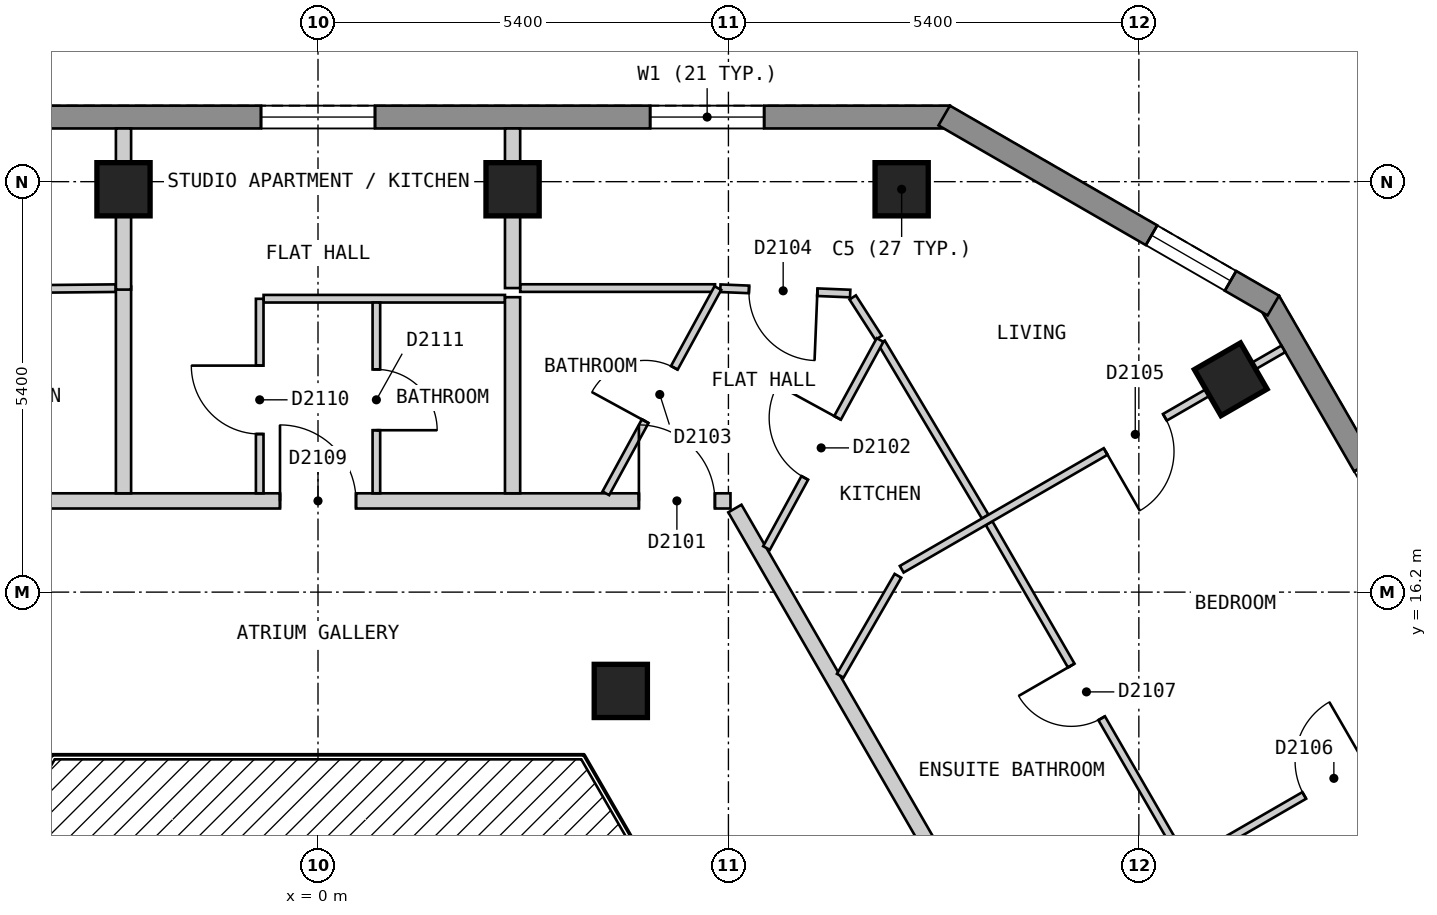
"""IFC4 building model, lengths in metres.
Left out: names, types, materials, properties, quantities, classifications, styles, units other than length and angle.
Written with IfcOpenShell. Run it as: python <this file> out.ifc"""

import sys

from ifc_helpers import new_model, si_unit, direction, frame, frame_2d, origin, origin_2d, place, context, subcontext, project, spatial, polyline, rectangle, outline, extrude, element, fill, save


model = new_model("IFC4")
c1 = context("Model", 3, precision=1e-05, world=origin(), true_north=direction((0.0, 1.0)))
c2 = subcontext(c1, "Body", "Model", "MODEL_VIEW")
j1 = project(units=[si_unit("LENGTHUNIT", "METRE"), si_unit("PLANEANGLEUNIT", "RADIAN")], contexts=[c1])
p1 = place(None, origin())
s1 = spatial("IfcSite", under=j1, at=p1, CompositionType="ELEMENT")
p2 = place(p1, origin())
s2 = spatial("IfcBuilding", under=s1, at=p2, CompositionType="ELEMENT")
p3 = place(p2, frame((0.0, 0.0, 205.8)))
s3 = spatial("IfcBuildingStorey", under=s2, at=p3, CompositionType="ELEMENT", Elevation=205.8)
for number, where, z_axis, x_axis in (
    (1, (7.679, 21.5, 0.0), (0.0, 0.0, 1.0), (-1.0, 0.0, 0.0)),
    (2, (2.56, 21.5, 0.0), (0.0, 0.0, 1.0), (-1.0, 0.0, 0.0)),
    (3, (-2.559, 21.5, 0.0), (0.0, 0.0, 1.0), (-1.0, 0.0, 0.0)),
    (4, (12.009, 19.0, 0.0), (0.0, 0.0, 1.0), (-0.5, 0.866, 0.0)),
    (5, (3.984, 14.9, 0.0), (0.0, 0.0, 1.0), (1.0, 0.0, 0.0)),
):
    element("IfcColumn", number, at=place(p3, frame(where, z_axis=z_axis, x_axis=x_axis)), inside=s3, PredefinedType="COLUMN", context=c2, shape_type="SweptSolid", body=[
        extrude(rectangle(XDim=0.7, YDim=0.7, at=origin_2d()), origin(), (0.0, 0.0, 1.0), 3.0),
    ])
p4 = place(p3, frame((8.314, 22.45, 0.0), z_axis=(0.0, 0.0, 1.0), x_axis=(-1.0, 0.0, 0.0)))
e6 = element("IfcWall", 6, at=p4, inside=s3, PredefinedType="SOLIDWALL", context=c2, shape_type="SweptSolid", body=[
    extrude(outline(polyline([(0.0, -0.15), (16.628, -0.15), (16.548, 0.15), (0.08, 0.15), (0.0, -0.15)])), origin(), (0.0, 0.0, 1.0), 2.7),
])
p5 = place(p4, frame((2.444, 0.0, 0.15)))
e7 = element("IfcOpeningElement", 7, at=p5, cuts=e6, PredefinedType="OPENING", context=c2, shape_type="SweptSolid", body=[
    extrude(rectangle(XDim=1.5, YDim=2.1, at=frame_2d((0.75, 1.05))), frame((0.0, 0.16, 0.0), z_axis=(0.0, -1.0, 0.0), x_axis=(1.0, 0.0, 0.0)), (0.0, 0.0, 1.0), 0.32),
])
p6 = place(p4, frame((7.564, 0.0, 0.15)))
e8 = element("IfcOpeningElement", 8, at=p6, cuts=e6, PredefinedType="OPENING", context=c2, shape_type="SweptSolid", body=[
    extrude(rectangle(XDim=1.5, YDim=2.1, at=frame_2d((0.75, 1.05))), frame((0.0, 0.16, 0.0), z_axis=(0.0, -1.0, 0.0), x_axis=(1.0, 0.0, 0.0)), (0.0, 0.0, 1.0), 0.32),
])
p7 = place(p4, frame((12.683, 0.0, 0.15)))
e9 = element("IfcOpeningElement", 9, at=p7, cuts=e6, PredefinedType="OPENING", context=c2, shape_type="SweptSolid", body=[
    extrude(rectangle(XDim=1.5, YDim=2.1, at=frame_2d((0.75, 1.05))), frame((0.0, 0.16, 0.0), z_axis=(0.0, -1.0, 0.0), x_axis=(1.0, 0.0, 0.0)), (0.0, 0.0, 1.0), 0.32),
])
p8 = place(p3, frame((23.599, 0.825, 0.0), z_axis=(0.0, 0.0, 1.0), x_axis=(-0.500003656944, 0.866023292436, 0.0)))
e10 = element("IfcWall", 10, at=p8, inside=s3, PredefinedType="SOLIDWALL", context=c2, shape_type="SweptSolid", body=[
    extrude(outline(polyline([(0.0, -0.15), (22.17, -0.15), (22.09, 0.15), (0.08, 0.15), (0.0, -0.15)])), origin(), (0.0, 0.0, 1.0), 2.7),
])
p9 = place(p8, frame((2.497, 0.0, 0.15)))
e11 = element("IfcOpeningElement", 11, at=p9, cuts=e10, PredefinedType="OPENING", context=c2, shape_type="SweptSolid", body=[
    extrude(rectangle(XDim=1.5, YDim=2.1, at=frame_2d((0.75, 1.05))), frame((0.0, 0.16, 0.0), z_axis=(0.0, -1.0, 0.0), x_axis=(1.0, 0.0, 0.0)), (0.0, 0.0, 1.0), 0.32),
])
p10 = place(p8, frame((7.723, 0.0, 0.15)))
e12 = element("IfcOpeningElement", 12, at=p10, cuts=e10, PredefinedType="OPENING", context=c2, shape_type="SweptSolid", body=[
    extrude(rectangle(XDim=1.5, YDim=2.1, at=frame_2d((0.75, 1.05))), frame((0.0, 0.16, 0.0), z_axis=(0.0, -1.0, 0.0), x_axis=(1.0, 0.0, 0.0)), (0.0, 0.0, 1.0), 0.32),
])
p11 = place(p8, frame((12.948, 0.0, 0.15)))
e13 = element("IfcOpeningElement", 13, at=p11, cuts=e10, PredefinedType="OPENING", context=c2, shape_type="SweptSolid", body=[
    extrude(rectangle(XDim=1.5, YDim=2.1, at=frame_2d((0.75, 1.05))), frame((0.0, 0.16, 0.0), z_axis=(0.0, -1.0, 0.0), x_axis=(1.0, 0.0, 0.0)), (0.0, 0.0, 1.0), 0.32),
])
p12 = place(p8, frame((18.173, 0.0, 0.15)))
e14 = element("IfcOpeningElement", 14, at=p12, cuts=e10, PredefinedType="OPENING", context=c2, shape_type="SweptSolid", body=[
    extrude(rectangle(XDim=1.5, YDim=2.1, at=frame_2d((0.75, 1.05))), frame((0.0, 0.16, 0.0), z_axis=(0.0, -1.0, 0.0), x_axis=(1.0, 0.0, 0.0)), (0.0, 0.0, 1.0), 0.32),
])
p13 = place(p3, frame((12.569, 19.97, 0.0), z_axis=(0.0, 0.0, 1.0), x_axis=(-0.866022959057, 0.500004234368, 0.0)))
e15 = element("IfcWall", 15, at=p13, inside=s3, PredefinedType="SOLIDWALL", context=c2, shape_type="SweptSolid", body=[
    extrude(outline(polyline([(0.0, -0.15), (5.0, -0.15), (4.92, 0.15), (0.08, 0.15), (0.0, -0.15)])), origin(), (0.0, 0.0, 1.0), 2.7),
])
p14 = place(p13, frame((0.65, 0.0, 0.15)))
e16 = element("IfcOpeningElement", 16, at=p14, cuts=e15, PredefinedType="OPENING", context=c2, shape_type="SweptSolid", body=[
    extrude(rectangle(XDim=1.2, YDim=2.1, at=frame_2d((0.6, 1.05))), frame((0.0, 0.16, 0.0), z_axis=(0.0, -1.0, 0.0), x_axis=(1.0, 0.0, 0.0)), (0.0, 0.0, 1.0), 0.32),
])
p15 = place(p3, frame((5.485, 17.3, 0.0), z_axis=(0.0, 0.0, 1.0), x_axis=(0.499943285704, -0.866058145322, 0.0)))
e17 = element("IfcWall", 17, at=p15, inside=s3, PredefinedType="PARTITIONING", context=c2, shape_type="SweptSolid", body=[
    extrude(rectangle(XDim=10.623, YDim=0.2, at=frame_2d((5.312, 0.0))), origin(), (0.0, 0.0, 1.0), 2.7),
])
p16 = place(p3, frame((-5.312, 17.4, 0.0), z_axis=(0.0, 0.0, 1.0), x_axis=(1.0, 0.0, 0.0)))
e18 = element("IfcWall", 18, at=p16, inside=s3, PredefinedType="PARTITIONING", context=c2, shape_type="SweptSolid", body=[
    extrude(rectangle(XDim=10.739, YDim=0.2, at=frame_2d((5.37, 0.0))), origin(), (0.0, 0.0, 1.0), 2.7),
])
p17 = place(p16, frame((9.534, 0.0, 0.0)))
e19 = element("IfcOpeningElement", 19, at=p17, cuts=e18, PredefinedType="OPENING", context=c2, shape_type="SweptSolid", body=[
    extrude(rectangle(XDim=1.0, YDim=2.1, at=frame_2d((0.5, 1.05))), frame((0.0, 0.11, 0.0), z_axis=(0.0, -1.0, 0.0), x_axis=(1.0, 0.0, 0.0)), (0.0, 0.0, 1.0), 0.22),
])
p18 = place(p16, frame((4.812, 0.0, 0.0)))
e20 = element("IfcOpeningElement", 20, at=p18, cuts=e18, PredefinedType="OPENING", context=c2, shape_type="SweptSolid", body=[
    extrude(rectangle(XDim=1.0, YDim=2.1, at=frame_2d((0.5, 1.05))), frame((0.0, 0.11, 0.0), z_axis=(0.0, -1.0, 0.0), x_axis=(1.0, 0.0, 0.0)), (0.0, 0.0, 1.0), 0.22),
])
p19 = place(p3, frame((7.035, 20.077, 0.0), z_axis=(0.0, 0.0, 1.0), x_axis=(0.540425167977, -0.841392083286, 0.0)))
e21 = element("IfcWall", 21, at=p19, inside=s3, PredefinedType="PARTITIONING", context=c2, shape_type="SweptSolid", body=[
    extrude(rectangle(XDim=0.631, YDim=0.1, at=frame_2d((0.315, 0.0))), origin(), (0.0, 0.0, 1.0), 2.7),
])
p20 = place(p3, frame((7.414, 19.484, 0.0), z_axis=(0.0, 0.0, 1.0), x_axis=(0.511881371655, -0.859056145634, 0.0)))
e22 = element("IfcWall", 22, at=p20, inside=s3, PredefinedType="PARTITIONING", context=c2, shape_type="SweptSolid", body=[
    extrude(rectangle(XDim=2.667, YDim=0.1, at=frame_2d((1.333, 0.0))), origin(), (0.0, 0.0, 1.0), 2.7),
])
p21 = place(p3, frame((8.829, 17.107, 0.0), z_axis=(0.0, 0.0, 1.0), x_axis=(0.500022055211, -0.866012669828, 0.0)))
e23 = element("IfcWall", 23, at=p21, inside=s3, PredefinedType="PARTITIONING", context=c2, shape_type="SweptSolid", body=[
    extrude(rectangle(XDim=5.126, YDim=0.1, at=frame_2d((2.563, 0.0))), origin(), (0.0, 0.0, 1.0), 2.7),
])
p22 = place(p21, frame((2.163, 0.0, 0.0)))
e24 = element("IfcOpeningElement", 24, at=p22, cuts=e23, PredefinedType="OPENING", context=c2, shape_type="SweptSolid", body=[
    extrude(rectangle(XDim=0.8, YDim=2.1, at=frame_2d((0.4, 1.05))), frame((0.0, 0.06, 0.0), z_axis=(0.0, -1.0, 0.0), x_axis=(1.0, 0.0, 0.0)), (0.0, 0.0, 1.0), 0.12),
])
p23 = place(p3, frame((5.294, 20.198, 0.0), z_axis=(0.0, 0.0, 1.0), x_axis=(0.999159599203, -0.040988965834, 0.0)))
e25 = element("IfcWall", 25, at=p23, inside=s3, PredefinedType="PARTITIONING", context=c2, shape_type="SweptSolid", body=[
    extrude(rectangle(XDim=1.709, YDim=0.1, at=frame_2d((0.855, 0.0))), origin(), (0.0, 0.0, 1.0), 2.7),
])
p24 = place(p23, frame((0.377, 0.0, 0.0)))
e26 = element("IfcOpeningElement", 26, at=p24, cuts=e25, PredefinedType="OPENING", context=c2, shape_type="SweptSolid", body=[
    extrude(rectangle(XDim=0.9, YDim=2.1, at=frame_2d((0.45, 1.05))), frame((0.0, 0.06, 0.0), z_axis=(0.0, -1.0, 0.0), x_axis=(1.0, 0.0, 0.0)), (0.0, 0.0, 1.0), 0.12),
])
p25 = place(p3, frame((-0.716, 20.06, 0.0), z_axis=(0.0, 0.0, 1.0), x_axis=(1.0, 0.0, 0.0)))
e27 = element("IfcWall", 27, at=p25, inside=s3, PredefinedType="PARTITIONING", context=c2, shape_type="SweptSolid", body=[
    extrude(rectangle(XDim=3.176, YDim=0.1, at=frame_2d((1.588, 0.0))), origin(), (0.0, 0.0, 1.0), 2.7),
])
p26 = place(p3, frame((2.66, 20.2, 0.0), z_axis=(0.0, 0.0, 1.0), x_axis=(1.0, 0.0, 0.0)))
e28 = element("IfcWall", 28, at=p26, inside=s3, PredefinedType="PARTITIONING", context=c2, shape_type="SweptSolid", body=[
    extrude(rectangle(XDim=2.564, YDim=0.1, at=frame_2d((1.282, 0.0))), origin(), (0.0, 0.0, 1.0), 2.7),
])
p27 = place(p3, frame((-6.259, 20.164, 0.0), z_axis=(0.0, 0.0, 1.0), x_axis=(0.999952982126, 0.009697089139, 0.0)))
e29 = element("IfcWall", 29, at=p27, inside=s3, PredefinedType="PARTITIONING", context=c2, shape_type="SweptSolid", body=[
    extrude(rectangle(XDim=3.6, YDim=0.1, at=frame_2d((1.8, 0.0))), origin(), (0.0, 0.0, 1.0), 2.7),
])
p28 = place(p3, frame((6.871, 15.1, 0.0), z_axis=(0.0, 0.0, 1.0), x_axis=(0.499805980977, 0.866137391745, 0.0)))
e30 = element("IfcWall", 30, at=p28, inside=s3, PredefinedType="PARTITIONING", context=c2, shape_type="SweptSolid", body=[
    extrude(rectangle(XDim=1.518, YDim=0.1, at=frame_2d((0.759, 0.0))), origin(), (0.0, 0.0, 1.0), 2.7),
])
p29 = place(p3, frame((3.787, 17.5, 0.0), z_axis=(0.0, 0.0, 1.0), x_axis=(0.479146828267, 0.877734764585, 0.0)))
e31 = element("IfcWall", 31, at=p29, inside=s3, PredefinedType="PARTITIONING", context=c2, shape_type="SweptSolid", body=[
    extrude(rectangle(XDim=3.076, YDim=0.1, at=frame_2d((1.538, 0.0))), origin(), (0.0, 0.0, 1.0), 2.7),
])
p30 = place(p29, frame((1.081, 0.0, 0.0)))
e32 = element("IfcOpeningElement", 32, at=p30, cuts=e31, PredefinedType="OPENING", context=c2, shape_type="SweptSolid", body=[
    extrude(rectangle(XDim=0.8, YDim=2.1, at=frame_2d((0.4, 1.05))), frame((0.0, 0.06, 0.0), z_axis=(0.0, -1.0, 0.0), x_axis=(1.0, 0.0, 0.0)), (0.0, 0.0, 1.0), 0.12),
])
p31 = place(p3, frame((5.901, 16.78, 0.0), z_axis=(0.0, 0.0, 1.0), x_axis=(0.479148317257, 0.877733951759, 0.0)))
e33 = element("IfcWall", 33, at=p31, inside=s3, PredefinedType="PARTITIONING", context=c2, shape_type="SweptSolid", body=[
    extrude(rectangle(XDim=3.118, YDim=0.1, at=frame_2d((1.559, 0.0))), origin(), (0.0, 0.0, 1.0), 2.7),
])
p32 = place(p31, frame((1.051, 0.0, 0.0)))
e34 = element("IfcOpeningElement", 34, at=p32, cuts=e33, PredefinedType="OPENING", context=c2, shape_type="SweptSolid", body=[
    extrude(rectangle(XDim=0.9, YDim=2.1, at=frame_2d((0.45, 1.05))), frame((0.0, 0.06, 0.0), z_axis=(0.0, -1.0, 0.0), x_axis=(1.0, 0.0, 0.0)), (0.0, 0.0, 1.0), 0.12),
])
p33 = place(p3, frame((0.768, 17.5, 0.0), z_axis=(0.0, 0.0, 1.0), x_axis=(0.0, 1.0, 0.0)))
e35 = element("IfcWall", 35, at=p33, inside=s3, PredefinedType="PARTITIONING", context=c2, shape_type="SweptSolid", body=[
    extrude(rectangle(XDim=2.51, YDim=0.1, at=frame_2d((1.255, 0.0))), origin(), (0.0, 0.0, 1.0), 2.7),
])
p34 = place(p33, frame((0.83, 0.0, 0.0)))
e36 = element("IfcOpeningElement", 36, at=p34, cuts=e35, PredefinedType="OPENING", context=c2, shape_type="SweptSolid", body=[
    extrude(rectangle(XDim=0.8, YDim=2.1, at=frame_2d((0.4, 1.05))), frame((0.0, 0.06, 0.0), z_axis=(0.0, -1.0, 0.0), x_axis=(1.0, 0.0, 0.0)), (0.0, 0.0, 1.0), 0.12),
])
p35 = place(p3, frame((-0.767, 17.5, 0.0), z_axis=(0.0, 0.0, 1.0), x_axis=(0.0, 1.0, 0.0)))
e37 = element("IfcWall", 37, at=p35, inside=s3, PredefinedType="PARTITIONING", context=c2, shape_type="SweptSolid", body=[
    extrude(rectangle(XDim=2.559, YDim=0.1, at=frame_2d((1.28, 0.0))), origin(), (0.0, 0.0, 1.0), 2.7),
])
p36 = place(p35, frame((0.78, 0.0, 0.0)))
e38 = element("IfcOpeningElement", 38, at=p36, cuts=e37, PredefinedType="OPENING", context=c2, shape_type="SweptSolid", body=[
    extrude(rectangle(XDim=0.9, YDim=2.1, at=frame_2d((0.45, 1.05))), frame((0.0, 0.06, 0.0), z_axis=(0.0, -1.0, 0.0), x_axis=(1.0, 0.0, 0.0)), (0.0, 0.0, 1.0), 0.12),
])
p37 = place(p3, frame((9.079, 11.275, 0.0), z_axis=(0.0, 0.0, 1.0), x_axis=(0.866001485781, 0.500041424909, 0.0)))
e39 = element("IfcWall", 39, at=p37, inside=s3, PredefinedType="PARTITIONING", context=c2, shape_type="SweptSolid", body=[
    extrude(rectangle(XDim=7.2, YDim=0.1, at=frame_2d((3.6, 0.0))), origin(), (0.0, 0.0, 1.0), 2.7),
])
p38 = place(p37, frame((4.5, 0.0, 0.0)))
e40 = element("IfcOpeningElement", 40, at=p38, cuts=e39, PredefinedType="OPENING", context=c2, shape_type="SweptSolid", body=[
    extrude(rectangle(XDim=0.9, YDim=2.1, at=frame_2d((0.45, 1.05))), frame((0.0, 0.06, 0.0), z_axis=(0.0, -1.0, 0.0), x_axis=(1.0, 0.0, 0.0)), (0.0, 0.0, 1.0), 0.12),
])
p39 = place(p3, frame((7.68, 16.501, 0.0), z_axis=(0.0, 0.0, 1.0), x_axis=(0.86602149507, 0.500006770031, 0.0)))
e41 = element("IfcWall", 41, at=p39, inside=s3, PredefinedType="PARTITIONING", context=c2, shape_type="SweptSolid", body=[
    extrude(rectangle(XDim=5.798, YDim=0.1, at=frame_2d((2.899, 0.0))), origin(), (0.0, 0.0, 1.0), 2.7),
])
p40 = place(p39, frame((3.098, 0.0, 0.0)))
e42 = element("IfcOpeningElement", 42, at=p40, cuts=e41, PredefinedType="OPENING", context=c2, shape_type="SweptSolid", body=[
    extrude(rectangle(XDim=0.9, YDim=2.1, at=frame_2d((0.45, 1.05))), frame((0.0, 0.06, 0.0), z_axis=(0.0, -1.0, 0.0), x_axis=(1.0, 0.0, 0.0)), (0.0, 0.0, 1.0), 0.12),
])
p41 = place(p3, frame((-2.559, 20.22, 0.0), z_axis=(0.0, 0.0, 1.0), x_axis=(0.0, -1.0, 0.0)))
e43 = element("IfcWall", 43, at=p41, inside=s3, PredefinedType="PARTITIONING", context=c2, shape_type="SweptSolid", body=[
    extrude(rectangle(XDim=2.72, YDim=0.2, at=frame_2d((1.36, 0.0))), origin(), (0.0, 0.0, 1.0), 2.7),
])
p42 = place(p3, frame((2.56, 20.08, 0.0), z_axis=(0.0, 0.0, 1.0), x_axis=(0.0, -1.0, 0.0)))
e44 = element("IfcWall", 44, at=p42, inside=s3, PredefinedType="PARTITIONING", context=c2, shape_type="SweptSolid", body=[
    extrude(rectangle(XDim=2.58, YDim=0.2, at=frame_2d((1.29, 0.0))), origin(), (0.0, 0.0, 1.0), 2.7),
])
p43 = place(p3, frame((2.56, 20.2, 0.0), z_axis=(0.0, 0.0, 1.0), x_axis=(0.0, 1.0, 0.0)))
e45 = element("IfcWall", 45, at=p43, inside=s3, PredefinedType="PARTITIONING", context=c2, shape_type="SweptSolid", body=[
    extrude(rectangle(XDim=2.1, YDim=0.2, at=frame_2d((1.05, 0.0))), origin(), (0.0, 0.0, 1.0), 2.7),
])
p44 = place(p3, frame((-2.559, 20.18, 0.0), z_axis=(0.0, 0.0, 1.0), x_axis=(0.0, 1.0, 0.0)))
e46 = element("IfcWall", 46, at=p44, inside=s3, PredefinedType="PARTITIONING", context=c2, shape_type="SweptSolid", body=[
    extrude(rectangle(XDim=2.12, YDim=0.2, at=frame_2d((1.06, 0.0))), origin(), (0.0, 0.0, 1.0), 2.7),
])
p45 = place(p5, origin())
e47 = element("IfcWindow", 47, at=p45, inside=s3, PartitioningType="SINGLE_PANEL", PredefinedType="WINDOW", context=c2, shape_type="SweptSolid", body=[
    extrude(rectangle(XDim=1.5, YDim=2.1, at=frame_2d((0.75, 1.05))), frame((0.0, 0.03, 0.0), z_axis=(0.0, -1.0, 0.0), x_axis=(1.0, 0.0, 0.0)), (0.0, 0.0, 1.0), 0.06),
])
fill(e7, e47)
p46 = place(p6, origin())
e48 = element("IfcWindow", 48, at=p46, inside=s3, PartitioningType="SINGLE_PANEL", PredefinedType="WINDOW", context=c2, shape_type="SweptSolid", body=[
    extrude(rectangle(XDim=1.5, YDim=2.1, at=frame_2d((0.75, 1.05))), frame((0.0, 0.03, 0.0), z_axis=(0.0, -1.0, 0.0), x_axis=(1.0, 0.0, 0.0)), (0.0, 0.0, 1.0), 0.06),
])
fill(e8, e48)
p47 = place(p14, origin())
e49 = element("IfcWindow", 49, at=p47, inside=s3, PartitioningType="SINGLE_PANEL", PredefinedType="WINDOW", context=c2, shape_type="SweptSolid", body=[
    extrude(rectangle(XDim=1.2, YDim=2.1, at=frame_2d((0.6, 1.05))), frame((0.0, 0.03, 0.0), z_axis=(0.0, -1.0, 0.0), x_axis=(1.0, 0.0, 0.0)), (0.0, 0.0, 1.0), 0.06),
])
fill(e16, e49)
p48 = place(p17, origin())
e50 = element("IfcDoor", 50, at=p48, inside=s3, OperationType="SINGLE_SWING_LEFT", PredefinedType="DOOR", context=c2, shape_type="SweptSolid", body=[
    extrude(rectangle(XDim=1.0, YDim=2.1, at=frame_2d((0.5, 1.05))), frame((0.0, 0.025, 0.0), z_axis=(0.0, -1.0, 0.0), x_axis=(1.0, 0.0, 0.0)), (0.0, 0.0, 1.0), 0.05),
])
fill(e19, e50)
p49 = place(p32, origin())
e51 = element("IfcDoor", 51, at=p49, inside=s3, OperationType="SINGLE_SWING_RIGHT", PredefinedType="DOOR", context=c2, shape_type="SweptSolid", body=[
    extrude(rectangle(XDim=0.9, YDim=2.1, at=frame_2d((0.45, 1.05))), frame((0.0, 0.025, 0.0), z_axis=(0.0, -1.0, 0.0), x_axis=(1.0, 0.0, 0.0)), (0.0, 0.0, 1.0), 0.05),
])
fill(e34, e51)
p50 = place(p30, origin())
e52 = element("IfcDoor", 52, at=p50, inside=s3, OperationType="SINGLE_SWING_LEFT", PredefinedType="DOOR", context=c2, shape_type="SweptSolid", body=[
    extrude(rectangle(XDim=0.8, YDim=2.1, at=frame_2d((0.4, 1.05))), frame((0.0, 0.025, 0.0), z_axis=(0.0, -1.0, 0.0), x_axis=(1.0, 0.0, 0.0)), (0.0, 0.0, 1.0), 0.05),
])
fill(e32, e52)
p51 = place(p24, origin())
e53 = element("IfcDoor", 53, at=p51, inside=s3, OperationType="SINGLE_SWING_RIGHT", PredefinedType="DOOR", context=c2, shape_type="SweptSolid", body=[
    extrude(rectangle(XDim=0.9, YDim=2.1, at=frame_2d((0.45, 1.05))), frame((0.0, 0.025, 0.0), z_axis=(0.0, -1.0, 0.0), x_axis=(1.0, 0.0, 0.0)), (0.0, 0.0, 1.0), 0.05),
])
fill(e26, e53)
p52 = place(p40, origin())
e54 = element("IfcDoor", 54, at=p52, inside=s3, OperationType="SINGLE_SWING_LEFT", PredefinedType="DOOR", context=c2, shape_type="SweptSolid", body=[
    extrude(rectangle(XDim=0.9, YDim=2.1, at=frame_2d((0.45, 1.05))), frame((0.0, 0.025, 0.0), z_axis=(0.0, -1.0, 0.0), x_axis=(1.0, 0.0, 0.0)), (0.0, 0.0, 1.0), 0.05),
])
fill(e42, e54)
p53 = place(p38, origin())
e55 = element("IfcDoor", 55, at=p53, inside=s3, OperationType="SINGLE_SWING_RIGHT", PredefinedType="DOOR", context=c2, shape_type="SweptSolid", body=[
    extrude(rectangle(XDim=0.9, YDim=2.1, at=frame_2d((0.45, 1.05))), frame((0.0, 0.025, 0.0), z_axis=(0.0, -1.0, 0.0), x_axis=(1.0, 0.0, 0.0)), (0.0, 0.0, 1.0), 0.05),
])
fill(e40, e55)
p54 = place(p22, origin())
e56 = element("IfcDoor", 56, at=p54, inside=s3, OperationType="SINGLE_SWING_LEFT", PredefinedType="DOOR", context=c2, shape_type="SweptSolid", body=[
    extrude(rectangle(XDim=0.8, YDim=2.1, at=frame_2d((0.4, 1.05))), frame((0.0, 0.025, 0.0), z_axis=(0.0, -1.0, 0.0), x_axis=(1.0, 0.0, 0.0)), (0.0, 0.0, 1.0), 0.05),
])
fill(e24, e56)
p55 = place(p18, origin())
e57 = element("IfcDoor", 57, at=p55, inside=s3, OperationType="SINGLE_SWING_LEFT", PredefinedType="DOOR", context=c2, shape_type="SweptSolid", body=[
    extrude(rectangle(XDim=1.0, YDim=2.1, at=frame_2d((0.5, 1.05))), frame((0.0, 0.025, 0.0), z_axis=(0.0, -1.0, 0.0), x_axis=(1.0, 0.0, 0.0)), (0.0, 0.0, 1.0), 0.05),
])
fill(e20, e57)
p56 = place(p36, origin())
e58 = element("IfcDoor", 58, at=p56, inside=s3, OperationType="SINGLE_SWING_RIGHT", PredefinedType="DOOR", context=c2, shape_type="SweptSolid", body=[
    extrude(rectangle(XDim=0.9, YDim=2.1, at=frame_2d((0.45, 1.05))), frame((0.0, 0.025, 0.0), z_axis=(0.0, -1.0, 0.0), x_axis=(1.0, 0.0, 0.0)), (0.0, 0.0, 1.0), 0.05),
])
fill(e38, e58)
p57 = place(p34, origin())
e59 = element("IfcDoor", 59, at=p57, inside=s3, OperationType="SINGLE_SWING_LEFT", PredefinedType="DOOR", context=c2, shape_type="SweptSolid", body=[
    extrude(rectangle(XDim=0.8, YDim=2.1, at=frame_2d((0.4, 1.05))), frame((0.0, 0.025, 0.0), z_axis=(0.0, -1.0, 0.0), x_axis=(1.0, 0.0, 0.0)), (0.0, 0.0, 1.0), 0.05),
])
fill(e36, e59)
save(model, sys.argv[1])
